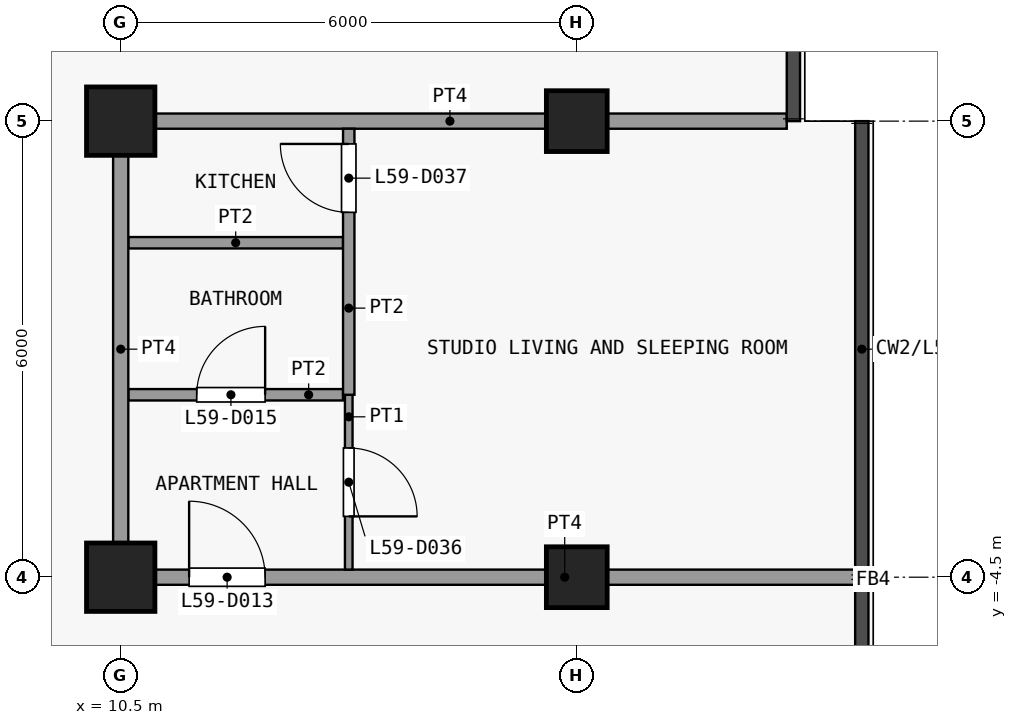
"""IFC4 building model, lengths in metres.
Left out: names, types, materials, properties, quantities, classifications, styles, units other than length and angle.
Written with IfcOpenShell. Run it as: python <this file> out.ifc"""

import sys

from ifc_helpers import new_model, si_unit, direction, frame, frame_2d, origin, origin_2d, place, context, subcontext, project, spatial, rectangle, extrude, element, fill, save


model = new_model("IFC4")
c1 = context("Model", 3, precision=1e-05, world=origin(), true_north=direction((0.0, 1.0)))
c2 = subcontext(c1, "Body", "Model", "MODEL_VIEW")
j1 = project(units=[si_unit("LENGTHUNIT", "METRE"), si_unit("PLANEANGLEUNIT", "RADIAN")], contexts=[c1])
p1 = place(None, origin())
s1 = spatial("IfcSite", under=j1, at=p1, CompositionType="ELEMENT")
p2 = place(p1, origin())
s2 = spatial("IfcBuilding", under=s1, at=p2, CompositionType="ELEMENT")
p3 = place(p2, frame((0.0, 0.0, 233.9)))
s3 = spatial("IfcBuildingStorey", under=s2, at=p3, CompositionType="ELEMENT", Elevation=233.9)
for number, where, z_axis, x_axis in (
    (1, (10.5, -4.5, 0.0), (0.0, 0.0, 1.0), (1.0, 0.0, 0.0)),
    (2, (10.5, 1.5, 0.0), (0.0, 0.0, 1.0), (1.0, 0.0, 0.0)),
):
    element("IfcColumn", number, at=place(p3, frame(where, z_axis=z_axis, x_axis=x_axis)), inside=s3, PredefinedType="COLUMN", context=c2, shape_type="SweptSolid", body=[
        extrude(rectangle(XDim=0.9, YDim=0.9, at=origin_2d()), origin(), (0.0, 0.0, 1.0), 3.6),
    ])
for number, where, z_axis, x_axis in (
    (3, (16.5, -4.5, 0.0), (0.0, 0.0, 1.0), (1.0, 0.0, 0.0)),
    (4, (16.5, 1.5, 0.0), (0.0, 0.0, 1.0), (1.0, 0.0, 0.0)),
):
    element("IfcColumn", number, at=place(p3, frame(where, z_axis=z_axis, x_axis=x_axis)), inside=s3, PredefinedType="COLUMN", context=c2, shape_type="SweptSolid", body=[
        extrude(rectangle(XDim=0.8, YDim=0.8, at=origin_2d()), origin(), (0.0, 0.0, 1.0), 3.6),
    ])
p4 = place(p3, frame((10.4, -4.5, 0.0), z_axis=(0.0, 0.0, 1.0), x_axis=(1.0, 0.0, 0.0)))
e5 = element("IfcWall", 5, at=p4, inside=s3, PredefinedType="PARTITIONING", context=c2, shape_type="SweptSolid", body=[
    extrude(rectangle(XDim=9.763, YDim=0.2, at=frame_2d((4.881, 0.0))), origin(), (0.0, 0.0, 1.0), 3.3),
])
p5 = place(p4, frame((1.0, 0.0, 0.0)))
e6 = element("IfcOpeningElement", 6, at=p5, cuts=e5, PredefinedType="OPENING", context=c2, shape_type="SweptSolid", body=[
    extrude(rectangle(XDim=1.0, YDim=2.1, at=frame_2d((0.5, 1.05))), frame((0.0, 0.11, 0.0), z_axis=(0.0, -1.0, 0.0), x_axis=(1.0, 0.0, 0.0)), (0.0, 0.0, 1.0), 0.22),
])
p6 = place(p3, frame((10.6, -2.1, 0.0), z_axis=(0.0, 0.0, 1.0), x_axis=(1.0, 0.0, 0.0)))
e7 = element("IfcWall", 7, at=p6, inside=s3, PredefinedType="PARTITIONING", context=c2, shape_type="SweptSolid", body=[
    extrude(rectangle(XDim=2.825, YDim=0.15, at=frame_2d((1.413, 0.0))), origin(), (0.0, 0.0, 1.0), 3.3),
])
p7 = place(p6, frame((0.9, 0.0, 0.0)))
e8 = element("IfcOpeningElement", 8, at=p7, cuts=e7, PredefinedType="OPENING", context=c2, shape_type="SweptSolid", body=[
    extrude(rectangle(XDim=0.9, YDim=2.1, at=frame_2d((0.45, 1.05))), frame((0.0, 0.085, 0.0), z_axis=(0.0, -1.0, 0.0), x_axis=(1.0, 0.0, 0.0)), (0.0, 0.0, 1.0), 0.17),
])
p8 = place(p3, frame((10.6, -0.1, 0.0), z_axis=(0.0, 0.0, 1.0), x_axis=(1.0, 0.0, 0.0)))
e9 = element("IfcWall", 9, at=p8, inside=s3, PredefinedType="PARTITIONING", context=c2, shape_type="SweptSolid", body=[
    extrude(rectangle(XDim=2.825, YDim=0.15, at=frame_2d((1.413, 0.0))), origin(), (0.0, 0.0, 1.0), 3.3),
])
p9 = place(p3, frame((10.4, 1.5, 0.0), z_axis=(0.0, 0.0, 1.0), x_axis=(1.0, 0.0, 0.0)))
e10 = element("IfcWall", 10, at=p9, inside=s3, PredefinedType="PARTITIONING", context=c2, shape_type="SweptSolid", body=[
    extrude(rectangle(XDim=8.863, YDim=0.2, at=frame_2d((4.431, 0.0))), origin(), (0.0, 0.0, 1.0), 3.3),
])
p10 = place(p3, frame((10.5, -4.4, 0.0), z_axis=(0.0, 0.0, 1.0), x_axis=(0.0, 1.0, 0.0)))
e11 = element("IfcWall", 11, at=p10, inside=s3, PredefinedType="PARTITIONING", context=c2, shape_type="SweptSolid", body=[
    extrude(rectangle(XDim=5.8, YDim=0.2, at=frame_2d((2.9, 0.0))), origin(), (0.0, 0.0, 1.0), 3.3),
])
p11 = place(p3, frame((13.5, -4.4, 0.0), z_axis=(0.0, 0.0, 1.0), x_axis=(0.0, 1.0, 0.0)))
e12 = element("IfcWall", 12, at=p11, inside=s3, PredefinedType="PARTITIONING", context=c2, shape_type="SweptSolid", body=[
    extrude(rectangle(XDim=2.3, YDim=0.1, at=frame_2d((1.15, 0.0))), origin(), (0.0, 0.0, 1.0), 3.3),
])
p12 = place(p11, frame((0.7, 0.0, 0.0)))
e13 = element("IfcOpeningElement", 13, at=p12, cuts=e12, PredefinedType="OPENING", context=c2, shape_type="SweptSolid", body=[
    extrude(rectangle(XDim=0.9, YDim=2.1, at=frame_2d((0.45, 1.05))), frame((0.0, 0.06, 0.0), z_axis=(0.0, -1.0, 0.0), x_axis=(1.0, 0.0, 0.0)), (0.0, 0.0, 1.0), 0.12),
])
p13 = place(p3, frame((13.5, -2.1, 0.0), z_axis=(0.0, 0.0, 1.0), x_axis=(0.0, 1.0, 0.0)))
e14 = element("IfcWall", 14, at=p13, inside=s3, PredefinedType="PARTITIONING", context=c2, shape_type="SweptSolid", body=[
    extrude(rectangle(XDim=3.5, YDim=0.15, at=frame_2d((1.75, 0.0))), origin(), (0.0, 0.0, 1.0), 3.3),
])
p14 = place(p13, frame((2.4, 0.0, 0.0)))
e15 = element("IfcOpeningElement", 15, at=p14, cuts=e14, PredefinedType="OPENING", context=c2, shape_type="SweptSolid", body=[
    extrude(rectangle(XDim=0.9, YDim=2.1, at=frame_2d((0.45, 1.05))), frame((0.0, 0.085, 0.0), z_axis=(0.0, -1.0, 0.0), x_axis=(1.0, 0.0, 0.0)), (0.0, 0.0, 1.0), 0.17),
])
p15 = place(p5, origin())
e16 = element("IfcDoor", 16, at=p15, inside=s3, OperationType="SINGLE_SWING_RIGHT", PredefinedType="DOOR", context=c2, shape_type="SweptSolid", body=[
    extrude(rectangle(XDim=1.0, YDim=2.1, at=frame_2d((0.5, 1.05))), frame((0.0, 0.025, 0.0), z_axis=(0.0, -1.0, 0.0), x_axis=(1.0, 0.0, 0.0)), (0.0, 0.0, 1.0), 0.05),
])
fill(e6, e16)
p16 = place(p7, origin())
e17 = element("IfcDoor", 17, at=p16, inside=s3, OperationType="SINGLE_SWING_LEFT", PredefinedType="DOOR", context=c2, shape_type="SweptSolid", body=[
    extrude(rectangle(XDim=0.9, YDim=2.1, at=frame_2d((0.45, 1.05))), frame((0.0, 0.025, 0.0), z_axis=(0.0, -1.0, 0.0), x_axis=(1.0, 0.0, 0.0)), (0.0, 0.0, 1.0), 0.05),
])
fill(e8, e17)
p17 = place(p12, origin())
e18 = element("IfcDoor", 18, at=p17, inside=s3, OperationType="SINGLE_SWING_LEFT", PredefinedType="DOOR", context=c2, shape_type="SweptSolid", body=[
    extrude(rectangle(XDim=0.9, YDim=2.1, at=frame_2d((0.45, 1.05))), frame((0.0, 0.025, 0.0), z_axis=(0.0, -1.0, 0.0), x_axis=(1.0, 0.0, 0.0)), (0.0, 0.0, 1.0), 0.05),
])
fill(e13, e18)
p18 = place(p14, origin())
e19 = element("IfcDoor", 19, at=p18, inside=s3, OperationType="SINGLE_SWING_LEFT", PredefinedType="DOOR", context=c2, shape_type="SweptSolid", body=[
    extrude(rectangle(XDim=0.9, YDim=2.1, at=frame_2d((0.45, 1.05))), frame((0.0, 0.025, 0.0), z_axis=(0.0, -1.0, 0.0), x_axis=(1.0, 0.0, 0.0)), (0.0, 0.0, 1.0), 0.05),
])
fill(e15, e19)
save(model, sys.argv[1])
